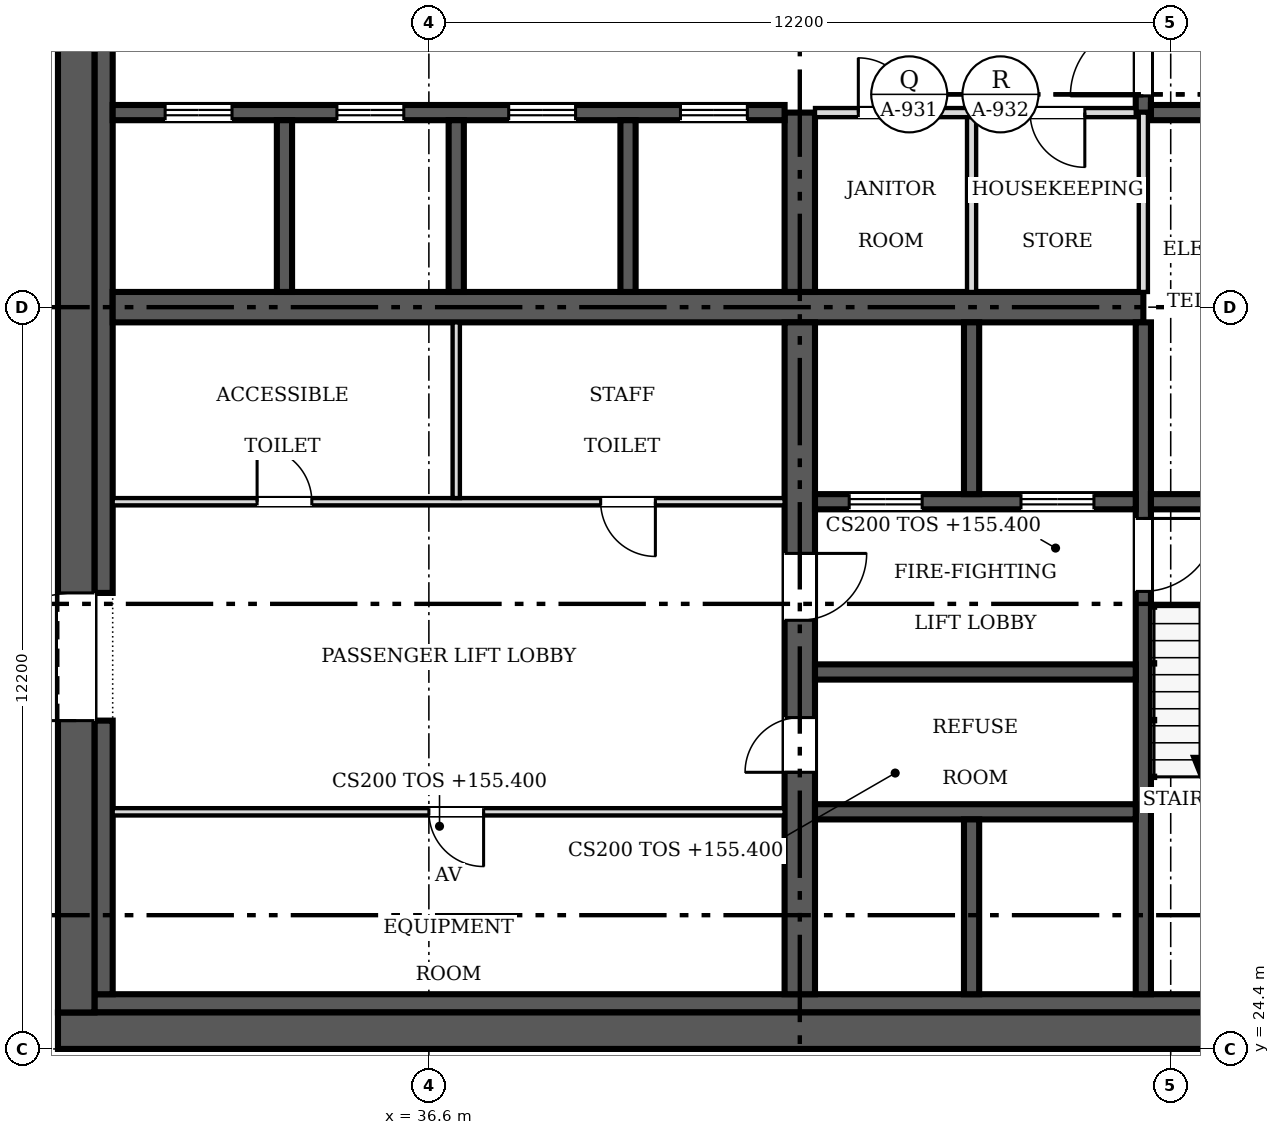
"""IFC4 building model, lengths in metres.
Left out: names, types, materials, properties, quantities, classifications, styles, units other than length and angle.
Written with IfcOpenShell. Run it as: python <this file> out.ifc"""

import sys

from ifc_helpers import new_model, si_unit, direction, frame, frame_2d, origin, place, context, subcontext, project, spatial, rectangle, extrude, source, transform, mapped, element, fill, save


model = new_model("IFC4")
c1 = context("Model", 3, precision=1e-05, world=origin(), true_north=direction((0.0, 1.0)))
c2 = subcontext(c1, "Body", "Model", "MODEL_VIEW")
j1 = project(units=[si_unit("LENGTHUNIT", "METRE"), si_unit("PLANEANGLEUNIT", "RADIAN")], contexts=[c1])
p1 = place(None, origin())
s1 = spatial("IfcSite", under=j1, at=p1, CompositionType="ELEMENT")
p2 = place(p1, origin())
s2 = spatial("IfcBuilding", under=s1, at=p2, CompositionType="ELEMENT")
p3 = place(p2, frame((0.0, 0.0, 155.4)))
s3 = spatial("IfcBuildingStorey", under=s2, at=p3, CompositionType="ELEMENT", Elevation=155.4)
p4 = place(p3, frame((54.9, 24.7, 0.0), z_axis=(0.0, 0.0, 1.0), x_axis=(-1.0, 0.0, 0.0)))
e1 = element("IfcWall", 1, at=p4, inside=s3, PredefinedType="SHEAR", context=c2, shape_type="SweptSolid", body=[
    extrude(rectangle(XDim=24.4, YDim=0.6, at=frame_2d((12.2, 0.0))), origin(), (0.0, 0.0, 1.0), 3.8),
])
m1 = source(origin(), c2, "Body", "SweptSolid", [
    extrude(rectangle(XDim=1.2, YDim=2.1, at=frame_2d((0.6, 1.05))), frame((0.0, 0.31, 0.0), z_axis=(0.0, -1.0, 0.0), x_axis=(1.0, 0.0, 0.0)), (0.0, 0.0, 1.0), 0.62),
])
p5 = place(p4, frame((1.5, 0.0, 0.0)))
e2 = element("IfcOpeningElement", 2, at=p5, cuts=e1, PredefinedType="OPENING", context=c2, shape_type="MappedRepresentation", body=[
    mapped(m1, transform((0.0, 0.0, 0.0), scale=1.0)),
])
p6 = place(p3, frame((30.8, 25.0, 0.0), z_axis=(0.0, 0.0, 1.0), x_axis=(0.0, 1.0, 0.0)))
e3 = element("IfcWall", 3, at=p6, inside=s3, PredefinedType="SHEAR", context=c2, shape_type="SweptSolid", body=[
    extrude(rectangle(XDim=23.2, YDim=0.6, at=frame_2d((11.6, 0.0))), origin(), (0.0, 0.0, 1.0), 3.8),
])
m2 = source(origin(), c2, "Body", "SweptSolid", [
    extrude(rectangle(XDim=2.1, YDim=2.4, at=frame_2d((1.05, 1.2))), frame((0.0, 0.31, 0.0), z_axis=(0.0, -1.0, 0.0), x_axis=(1.0, 0.0, 0.0)), (0.0, 0.0, 1.0), 0.62),
])
p7 = place(p6, frame((4.8, 0.0, 0.0)))
e4 = element("IfcOpeningElement", 4, at=p7, cuts=e3, PredefinedType="OPENING", context=c2, shape_type="MappedRepresentation", body=[
    mapped(m2, transform((0.0, 0.0, 0.0), scale=1.0)),
])
p8 = place(p6, frame((16.3, 0.0, 0.0)))
e5 = element("IfcOpeningElement", 5, at=p8, cuts=e3, PredefinedType="OPENING", context=c2, shape_type="MappedRepresentation", body=[
    mapped(m2, transform((0.0, 0.0, 0.0), scale=1.0)),
])
p9 = place(p3, frame((31.1, 25.15, 0.0), z_axis=(0.0, 0.0, 1.0), x_axis=(1.0, 0.0, 0.0)))
e6 = element("IfcWall", 6, at=p9, inside=s3, PredefinedType="SOLIDWALL", context=c2, shape_type="SweptSolid", body=[
    extrude(rectangle(XDim=21.1, YDim=0.3, at=frame_2d((10.55, 0.0))), origin(), (0.0, 0.0, 1.0), 3.8),
])
p10 = place(p3, frame((31.25, 25.3, 0.0), z_axis=(0.0, 0.0, 1.0), x_axis=(0.0, 1.0, 0.0)))
e7 = element("IfcWall", 7, at=p10, inside=s3, PredefinedType="SOLIDWALL", context=c2, shape_type="SweptSolid", body=[
    extrude(rectangle(XDim=4.5, YDim=0.3, at=frame_2d((2.25, 0.0))), origin(), (0.0, 0.0, 1.0), 3.8),
])
p11 = place(p3, frame((31.25, 31.9, 0.0), z_axis=(0.0, 0.0, 1.0), x_axis=(0.0, 1.0, 0.0)))
e8 = element("IfcWall", 8, at=p11, inside=s3, PredefinedType="SOLIDWALL", context=c2, shape_type="SweptSolid", body=[
    extrude(rectangle(XDim=9.4, YDim=0.3, at=frame_2d((4.7, 0.0))), origin(), (0.0, 0.0, 1.0), 3.8),
])
p12 = place(p3, frame((31.4, 36.6, 0.0), z_axis=(0.0, 0.0, 1.0), x_axis=(1.0, 0.0, 0.0)))
e9 = element("IfcWall", 9, at=p12, inside=s3, PredefinedType="SHEAR", context=c2, shape_type="SweptSolid", body=[
    extrude(rectangle(XDim=16.95, YDim=0.5, at=frame_2d((8.475, 0.0))), origin(), (0.0, 0.0, 1.0), 3.8),
])
p13 = place(p3, frame((42.7, 36.35, 0.0), z_axis=(0.0, 0.0, 1.0), x_axis=(0.0, -1.0, 0.0)))
e10 = element("IfcWall", 10, at=p13, inside=s3, PredefinedType="SHEAR", context=c2, shape_type="SweptSolid", body=[
    extrude(rectangle(XDim=11.05, YDim=0.5, at=frame_2d((5.525, 0.0))), origin(), (0.0, 0.0, 1.0), 3.8),
])
m3 = source(origin(), c2, "Body", "SweptSolid", [
    extrude(rectangle(XDim=0.9, YDim=2.1, at=frame_2d((0.45, 1.05))), frame((0.0, 0.26, 0.0), z_axis=(0.0, -1.0, 0.0), x_axis=(1.0, 0.0, 0.0)), (0.0, 0.0, 1.0), 0.52),
])
p14 = place(p13, frame((6.5, 0.0, 0.0)))
e11 = element("IfcOpeningElement", 11, at=p14, cuts=e10, PredefinedType="OPENING", context=c2, shape_type="MappedRepresentation", body=[
    mapped(m3, transform((0.0, 0.0, 0.0), scale=1.0)),
])
m4 = source(origin(), c2, "Body", "SweptSolid", [
    extrude(rectangle(XDim=1.1, YDim=2.1, at=frame_2d((0.55, 1.05))), frame((0.0, 0.26, 0.0), z_axis=(0.0, -1.0, 0.0), x_axis=(1.0, 0.0, 0.0)), (0.0, 0.0, 1.0), 0.52),
])
p15 = place(p13, frame((3.8, 0.0, 0.0)))
e12 = element("IfcOpeningElement", 12, at=p15, cuts=e10, PredefinedType="OPENING", context=c2, shape_type="MappedRepresentation", body=[
    mapped(m4, transform((0.0, 0.0, 0.0), scale=1.0)),
])
p16 = place(p3, frame((42.7, 36.85, 0.0), z_axis=(0.0, 0.0, 1.0), x_axis=(0.0, 1.0, 0.0)))
e13 = element("IfcWall", 13, at=p16, inside=s3, PredefinedType="SHEAR", context=c2, shape_type="SweptSolid", body=[
    extrude(rectangle(XDim=2.95, YDim=0.5, at=frame_2d((1.475, 0.0))), origin(), (0.0, 0.0, 1.0), 3.8),
])
p17 = place(p3, frame((31.4, 39.8, 0.0), z_axis=(0.0, 0.0, 1.0), x_axis=(1.0, 0.0, 0.0)))
e14 = element("IfcWall", 14, at=p17, inside=s3, PredefinedType="SOLIDWALL", context=c2, shape_type="SweptSolid", body=[
    extrude(rectangle(XDim=11.05, YDim=0.25, at=frame_2d((5.525, 0.0))), origin(), (0.0, 0.0, 1.0), 3.8),
])
m5 = source(origin(), c2, "Body", "SweptSolid", [
    extrude(rectangle(XDim=1.1, YDim=2.1, at=frame_2d((0.55, 1.05))), frame((0.0, 0.135, 0.0), z_axis=(0.0, -1.0, 0.0), x_axis=(1.0, 0.0, 0.0)), (0.0, 0.0, 1.0), 0.27),
])
p18 = place(p17, frame((0.863, 0.0, 0.0)))
e15 = element("IfcOpeningElement", 15, at=p18, cuts=e14, PredefinedType="OPENING", context=c2, shape_type="MappedRepresentation", body=[
    mapped(m5, transform((0.0, 0.0, 0.0), scale=1.0)),
])
p19 = place(p17, frame((3.688, 0.0, 0.0)))
e16 = element("IfcOpeningElement", 16, at=p19, cuts=e14, PredefinedType="OPENING", context=c2, shape_type="MappedRepresentation", body=[
    mapped(m5, transform((0.0, 0.0, 0.0), scale=1.0)),
])
p20 = place(p17, frame((6.512, 0.0, 0.0)))
e17 = element("IfcOpeningElement", 17, at=p20, cuts=e14, PredefinedType="OPENING", context=c2, shape_type="MappedRepresentation", body=[
    mapped(m5, transform((0.0, 0.0, 0.0), scale=1.0)),
])
p21 = place(p17, frame((9.337, 0.0, 0.0)))
e18 = element("IfcOpeningElement", 18, at=p21, cuts=e14, PredefinedType="OPENING", context=c2, shape_type="MappedRepresentation", body=[
    mapped(m5, transform((0.0, 0.0, 0.0), scale=1.0)),
])
p22 = place(p3, frame((48.35, 36.35, 0.0), z_axis=(0.0, 0.0, 1.0), x_axis=(0.0, -1.0, 0.0)))
e19 = element("IfcWall", 19, at=p22, inside=s3, PredefinedType="SOLIDWALL", context=c2, shape_type="SweptSolid", body=[
    extrude(rectangle(XDim=11.05, YDim=0.25, at=frame_2d((5.525, 0.0))), origin(), (0.0, 0.0, 1.0), 3.8),
])
m6 = source(origin(), c2, "Body", "SweptSolid", [
    extrude(rectangle(XDim=1.2, YDim=2.1, at=frame_2d((0.6, 1.05))), frame((0.0, 0.135, 0.0), z_axis=(0.0, -1.0, 0.0), x_axis=(1.0, 0.0, 0.0)), (0.0, 0.0, 1.0), 0.27),
])
p23 = place(p22, frame((3.225, 0.0, 0.0)))
e20 = element("IfcOpeningElement", 20, at=p23, cuts=e19, PredefinedType="OPENING", context=c2, shape_type="MappedRepresentation", body=[
    mapped(m6, transform((0.0, 0.0, 0.0), scale=1.0)),
])
p24 = place(p3, frame((48.225, 33.4, 0.0), z_axis=(0.0, 0.0, 1.0), x_axis=(-1.0, 0.0, 0.0)))
e21 = element("IfcWall", 21, at=p24, inside=s3, PredefinedType="SOLIDWALL", context=c2, shape_type="SweptSolid", body=[
    extrude(rectangle(XDim=5.275, YDim=0.25, at=frame_2d((2.638, 0.0))), origin(), (0.0, 0.0, 1.0), 3.8),
])
p25 = place(p24, frame((3.512, 0.0, 0.0)))
e22 = element("IfcOpeningElement", 22, at=p25, cuts=e21, PredefinedType="OPENING", context=c2, shape_type="MappedRepresentation", body=[
    mapped(m6, transform((0.0, 0.0, 0.0), scale=1.0)),
])
p26 = place(p24, frame((0.688, 0.0, 0.0)))
e23 = element("IfcOpeningElement", 23, at=p26, cuts=e21, PredefinedType="OPENING", context=c2, shape_type="MappedRepresentation", body=[
    mapped(m6, transform((0.0, 0.0, 0.0), scale=1.0)),
])
p27 = place(p3, frame((48.475, 33.4, 0.0), z_axis=(0.0, 0.0, 1.0), x_axis=(1.0, 0.0, 0.0)))
e24 = element("IfcWall", 24, at=p27, inside=s3, PredefinedType="SOLIDWALL", context=c2, shape_type="SweptSolid", body=[
    extrude(rectangle(XDim=3.525, YDim=0.25, at=frame_2d((1.762, 0.0))), origin(), (0.0, 0.0, 1.0), 3.8),
])
p28 = place(p3, frame((48.35, 47.9, 0.0), z_axis=(0.0, 0.0, 1.0), x_axis=(0.0, -1.0, 0.0)))
e25 = element("IfcWall", 25, at=p28, inside=s3, PredefinedType="SOLIDWALL", context=c2, shape_type="SweptSolid", body=[
    extrude(rectangle(XDim=8.1, YDim=0.25, at=frame_2d((4.05, 0.0))), origin(), (0.0, 0.0, 1.0), 3.8),
])
p29 = place(p28, frame((6.625, 0.0, 0.0)))
e26 = element("IfcOpeningElement", 26, at=p29, cuts=e25, PredefinedType="OPENING", context=c2, shape_type="MappedRepresentation", body=[
    mapped(m6, transform((0.0, 0.0, 0.0), scale=1.0)),
])
for number, where, z_axis, x_axis in (
    (27, (42.95, 28.3, 0.0), (0.0, 0.0, 1.0), (1.0, 0.0, 0.0)),
    (28, (42.95, 30.6, 0.0), (0.0, 0.0, 1.0), (1.0, 0.0, 0.0)),
):
    element("IfcWall", number, at=place(p3, frame(where, z_axis=z_axis, x_axis=x_axis)), inside=s3, PredefinedType="SOLIDWALL", context=c2, shape_type="SweptSolid", body=[
        extrude(rectangle(XDim=5.275, YDim=0.25, at=frame_2d((2.638, 0.0))), origin(), (0.0, 0.0, 1.0), 3.8),
    ])
p30 = place(p3, frame((48.475, 39.8, 0.0), z_axis=(0.0, 0.0, 1.0), x_axis=(1.0, 0.0, 0.0)))
e29 = element("IfcWall", 29, at=p30, inside=s3, PredefinedType="SOLIDWALL", context=c2, shape_type="SweptSolid", body=[
    extrude(rectangle(XDim=3.4, YDim=0.25, at=frame_2d((1.7, 0.0))), origin(), (0.0, 0.0, 1.0), 3.8),
])
for number, where, z_axis, x_axis in (
    (30, (34.225, 36.85, 0.0), (0.0, 0.0, 1.0), (0.0, 1.0, 0.0)),
    (31, (37.05, 36.85, 0.0), (0.0, 0.0, 1.0), (0.0, 1.0, 0.0)),
    (32, (39.875, 36.85, 0.0), (0.0, 0.0, 1.0), (0.0, 1.0, 0.0)),
):
    element("IfcWall", number, at=place(p3, frame(where, z_axis=z_axis, x_axis=x_axis)), inside=s3, PredefinedType="SOLIDWALL", context=c2, shape_type="SweptSolid", body=[
        extrude(rectangle(XDim=2.825, YDim=0.25, at=frame_2d((1.413, 0.0))), origin(), (0.0, 0.0, 1.0), 3.8),
    ])
p31 = place(p3, frame((45.525, 33.525, 0.0), z_axis=(0.0, 0.0, 1.0), x_axis=(0.0, 1.0, 0.0)))
e33 = element("IfcWall", 33, at=p31, inside=s3, PredefinedType="SOLIDWALL", context=c2, shape_type="SweptSolid", body=[
    extrude(rectangle(XDim=2.825, YDim=0.25, at=frame_2d((1.413, 0.0))), origin(), (0.0, 0.0, 1.0), 3.8),
])
p32 = place(p3, frame((45.525, 25.3, 0.0), z_axis=(0.0, 0.0, 1.0), x_axis=(0.0, 1.0, 0.0)))
e34 = element("IfcWall", 34, at=p32, inside=s3, PredefinedType="SOLIDWALL", context=c2, shape_type="SweptSolid", body=[
    extrude(rectangle(XDim=2.875, YDim=0.25, at=frame_2d((1.438, 0.0))), origin(), (0.0, 0.0, 1.0), 3.8),
])
p33 = place(p3, frame((42.45, 28.3, 0.0), z_axis=(0.0, 0.0, 1.0), x_axis=(-1.0, 0.0, 0.0)))
e35 = element("IfcWall", 35, at=p33, inside=s3, PredefinedType="PARTITIONING", context=c2, shape_type="SweptSolid", body=[
    extrude(rectangle(XDim=11.05, YDim=0.12, at=frame_2d((5.525, 0.0))), origin(), (0.0, 0.0, 1.0), 3.6),
])
m7 = source(origin(), c2, "Body", "SweptSolid", [
    extrude(rectangle(XDim=0.9, YDim=2.1, at=frame_2d((0.45, 1.05))), frame((0.0, 0.07, 0.0), z_axis=(0.0, -1.0, 0.0), x_axis=(1.0, 0.0, 0.0)), (0.0, 0.0, 1.0), 0.14),
])
p34 = place(p33, frame((4.95, 0.0, 0.0)))
e36 = element("IfcOpeningElement", 36, at=p34, cuts=e35, PredefinedType="OPENING", context=c2, shape_type="MappedRepresentation", body=[
    mapped(m7, transform((0.0, 0.0, 0.0), scale=1.0)),
])
p35 = place(p3, frame((31.4, 33.4, 0.0), z_axis=(0.0, 0.0, 1.0), x_axis=(1.0, 0.0, 0.0)))
e37 = element("IfcWall", 37, at=p35, inside=s3, PredefinedType="PARTITIONING", context=c2, shape_type="SweptSolid", body=[
    extrude(rectangle(XDim=11.05, YDim=0.12, at=frame_2d((5.525, 0.0))), origin(), (0.0, 0.0, 1.0), 3.6),
])
p36 = place(p35, frame((2.375, 0.0, 0.0)))
e38 = element("IfcOpeningElement", 38, at=p36, cuts=e37, PredefinedType="OPENING", context=c2, shape_type="MappedRepresentation", body=[
    mapped(m7, transform((0.0, 0.0, 0.0), scale=1.0)),
])
p37 = place(p35, frame((8.025, 0.0, 0.0)))
e39 = element("IfcOpeningElement", 39, at=p37, cuts=e37, PredefinedType="OPENING", context=c2, shape_type="MappedRepresentation", body=[
    mapped(m7, transform((0.0, 0.0, 0.0), scale=1.0)),
])
p38 = place(p3, frame((48.225, 39.8, 0.0), z_axis=(0.0, 0.0, 1.0), x_axis=(-1.0, 0.0, 0.0)))
e40 = element("IfcWall", 40, at=p38, inside=s3, PredefinedType="PARTITIONING", context=c2, shape_type="SweptSolid", body=[
    extrude(rectangle(XDim=5.275, YDim=0.15, at=frame_2d((2.638, 0.0))), origin(), (0.0, 0.0, 1.0), 3.6),
])
m8 = source(origin(), c2, "Body", "SweptSolid", [
    extrude(rectangle(XDim=0.9, YDim=2.1, at=frame_2d((0.45, 1.05))), frame((0.0, 0.085, 0.0), z_axis=(0.0, -1.0, 0.0), x_axis=(1.0, 0.0, 0.0)), (0.0, 0.0, 1.0), 0.17),
])
p39 = place(p38, frame((3.663, 0.0, 0.0)))
e41 = element("IfcOpeningElement", 41, at=p39, cuts=e40, PredefinedType="OPENING", context=c2, shape_type="MappedRepresentation", body=[
    mapped(m8, transform((0.0, 0.0, 0.0), scale=1.0)),
])
p40 = place(p38, frame((0.837, 0.0, 0.0)))
e42 = element("IfcOpeningElement", 42, at=p40, cuts=e40, PredefinedType="OPENING", context=c2, shape_type="MappedRepresentation", body=[
    mapped(m8, transform((0.0, 0.0, 0.0), scale=1.0)),
])
p41 = place(p3, frame((45.525, 36.85, 0.0), z_axis=(0.0, 0.0, 1.0), x_axis=(0.0, 1.0, 0.0)))
e43 = element("IfcWall", 43, at=p41, inside=s3, PredefinedType="PARTITIONING", context=c2, shape_type="SweptSolid", body=[
    extrude(rectangle(XDim=2.875, YDim=0.15, at=frame_2d((1.438, 0.0))), origin(), (0.0, 0.0, 1.0), 3.6),
])
p42 = place(p3, frame((48.35, 36.85, 0.0), z_axis=(0.0, 0.0, 1.0), x_axis=(0.0, 1.0, 0.0)))
e44 = element("IfcWall", 44, at=p42, inside=s3, PredefinedType="PARTITIONING", context=c2, shape_type="SweptSolid", body=[
    extrude(rectangle(XDim=2.95, YDim=0.15, at=frame_2d((1.475, 0.0))), origin(), (0.0, 0.0, 1.0), 3.6),
])
p43 = place(p3, frame((37.05, 33.46, 0.0), z_axis=(0.0, 0.0, 1.0), x_axis=(0.0, 1.0, 0.0)))
e45 = element("IfcWall", 45, at=p43, inside=s3, PredefinedType="PARTITIONING", context=c2, shape_type="SweptSolid", body=[
    extrude(rectangle(XDim=2.89, YDim=0.12, at=frame_2d((1.445, 0.0))), origin(), (0.0, 0.0, 1.0), 3.6),
])
m9 = source(origin(), c2, "Body", "SweptSolid", [
    extrude(rectangle(XDim=2.1, YDim=2.4, at=frame_2d((1.05, 1.2))), frame((0.0, 0.025, 0.0), z_axis=(0.0, -1.0, 0.0), x_axis=(1.0, 0.0, 0.0)), (0.0, 0.0, 1.0), 0.05),
])
p44 = place(p7, origin())
e46 = element("IfcDoor", 46, at=p44, inside=s3, OperationType="DOUBLE_DOOR_SINGLE_SWING", PredefinedType="DOOR", context=c2, shape_type="MappedRepresentation", body=[
    mapped(m9, transform((0.0, 0.0, 0.0), scale=1.0)),
])
fill(e4, e46)
m10 = source(origin(), c2, "Body", "SweptSolid", [
    extrude(rectangle(XDim=0.9, YDim=2.1, at=frame_2d((0.45, 1.05))), frame((0.0, 0.025, 0.0), z_axis=(0.0, -1.0, 0.0), x_axis=(1.0, 0.0, 0.0)), (0.0, 0.0, 1.0), 0.05),
])
p45 = place(p14, origin())
e47 = element("IfcDoor", 47, at=p45, inside=s3, OperationType="SINGLE_SWING_RIGHT", PredefinedType="DOOR", context=c2, shape_type="MappedRepresentation", body=[
    mapped(m10, transform((0.0, 0.0, 0.0), scale=1.0)),
])
fill(e11, e47)
m11 = source(origin(), c2, "Body", "SweptSolid", [
    extrude(rectangle(XDim=1.1, YDim=2.1, at=frame_2d((0.55, 1.05))), frame((0.0, 0.025, 0.0), z_axis=(0.0, -1.0, 0.0), x_axis=(1.0, 0.0, 0.0)), (0.0, 0.0, 1.0), 0.05),
])
p46 = place(p15, origin())
e48 = element("IfcDoor", 48, at=p46, inside=s3, OperationType="SINGLE_SWING_LEFT", PredefinedType="DOOR", context=c2, shape_type="MappedRepresentation", body=[
    mapped(m11, transform((0.0, 0.0, 0.0), scale=1.0)),
])
fill(e12, e48)
p47 = place(p18, origin())
e49 = element("IfcDoor", 49, at=p47, inside=s3, OperationType="DOUBLE_DOOR_SLIDING", PredefinedType="DOOR", context=c2, shape_type="MappedRepresentation", body=[
    mapped(m11, transform((0.0, 0.0, 0.0), scale=1.0)),
])
fill(e15, e49)
p48 = place(p19, origin())
e50 = element("IfcDoor", 50, at=p48, inside=s3, OperationType="DOUBLE_DOOR_SLIDING", PredefinedType="DOOR", context=c2, shape_type="MappedRepresentation", body=[
    mapped(m11, transform((0.0, 0.0, 0.0), scale=1.0)),
])
fill(e16, e50)
p49 = place(p20, origin())
e51 = element("IfcDoor", 51, at=p49, inside=s3, OperationType="DOUBLE_DOOR_SLIDING", PredefinedType="DOOR", context=c2, shape_type="MappedRepresentation", body=[
    mapped(m11, transform((0.0, 0.0, 0.0), scale=1.0)),
])
fill(e17, e51)
p50 = place(p21, origin())
e52 = element("IfcDoor", 52, at=p50, inside=s3, OperationType="DOUBLE_DOOR_SLIDING", PredefinedType="DOOR", context=c2, shape_type="MappedRepresentation", body=[
    mapped(m11, transform((0.0, 0.0, 0.0), scale=1.0)),
])
fill(e18, e52)
m12 = source(origin(), c2, "Body", "SweptSolid", [
    extrude(rectangle(XDim=1.2, YDim=2.1, at=frame_2d((0.6, 1.05))), frame((0.0, 0.025, 0.0), z_axis=(0.0, -1.0, 0.0), x_axis=(1.0, 0.0, 0.0)), (0.0, 0.0, 1.0), 0.05),
])
p51 = place(p23, origin())
e53 = element("IfcDoor", 53, at=p51, inside=s3, OperationType="SINGLE_SWING_LEFT", PredefinedType="DOOR", context=c2, shape_type="MappedRepresentation", body=[
    mapped(m12, transform((0.0, 0.0, 0.0), scale=1.0)),
])
fill(e20, e53)
p52 = place(p25, origin())
e54 = element("IfcDoor", 54, at=p52, inside=s3, OperationType="DOUBLE_DOOR_SLIDING", PredefinedType="DOOR", context=c2, shape_type="MappedRepresentation", body=[
    mapped(m12, transform((0.0, 0.0, 0.0), scale=1.0)),
])
fill(e22, e54)
p53 = place(p26, origin())
e55 = element("IfcDoor", 55, at=p53, inside=s3, OperationType="DOUBLE_DOOR_SLIDING", PredefinedType="DOOR", context=c2, shape_type="MappedRepresentation", body=[
    mapped(m12, transform((0.0, 0.0, 0.0), scale=1.0)),
])
fill(e23, e55)
p54 = place(p29, origin())
e56 = element("IfcDoor", 56, at=p54, inside=s3, OperationType="SINGLE_SWING_RIGHT", PredefinedType="DOOR", context=c2, shape_type="MappedRepresentation", body=[
    mapped(m12, transform((0.0, 0.0, 0.0), scale=1.0)),
])
fill(e26, e56)
p55 = place(p34, origin())
e57 = element("IfcDoor", 57, at=p55, inside=s3, OperationType="SINGLE_SWING_LEFT", PredefinedType="DOOR", context=c2, shape_type="MappedRepresentation", body=[
    mapped(m10, transform((0.0, 0.0, 0.0), scale=1.0)),
])
fill(e36, e57)
p56 = place(p36, origin())
e58 = element("IfcDoor", 58, at=p56, inside=s3, OperationType="SINGLE_SWING_LEFT", PredefinedType="DOOR", context=c2, shape_type="MappedRepresentation", body=[
    mapped(m10, transform((0.0, 0.0, 0.0), scale=1.0)),
])
fill(e38, e58)
p57 = place(p37, origin())
e59 = element("IfcDoor", 59, at=p57, inside=s3, OperationType="SINGLE_SWING_RIGHT", PredefinedType="DOOR", context=c2, shape_type="MappedRepresentation", body=[
    mapped(m10, transform((0.0, 0.0, 0.0), scale=1.0)),
])
fill(e39, e59)
p58 = place(p39, origin())
e60 = element("IfcDoor", 60, at=p58, inside=s3, OperationType="SINGLE_SWING_RIGHT", PredefinedType="DOOR", context=c2, shape_type="MappedRepresentation", body=[
    mapped(m10, transform((0.0, 0.0, 0.0), scale=1.0)),
])
fill(e41, e60)
p59 = place(p40, origin())
e61 = element("IfcDoor", 61, at=p59, inside=s3, OperationType="SINGLE_SWING_LEFT", PredefinedType="DOOR", context=c2, shape_type="MappedRepresentation", body=[
    mapped(m10, transform((0.0, 0.0, 0.0), scale=1.0)),
])
fill(e42, e61)
save(model, sys.argv[1])
